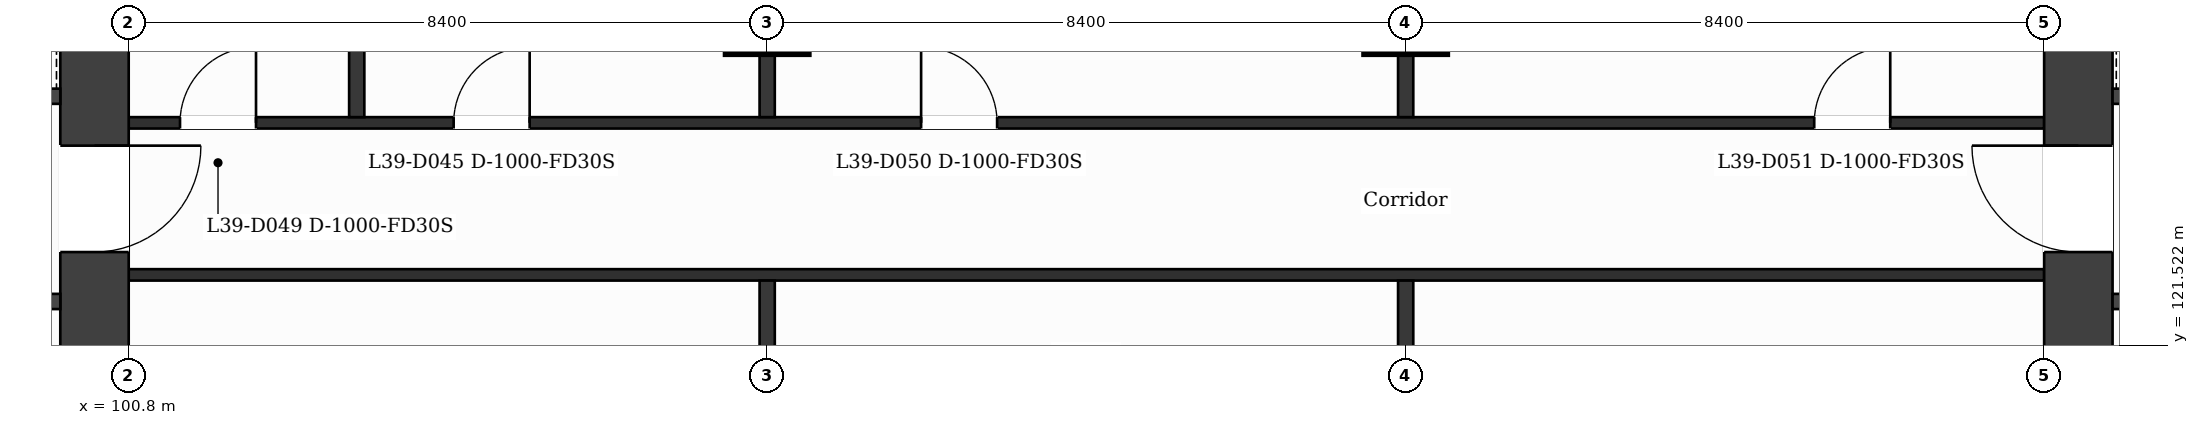
"""IFC4 building model, lengths in metres.
Left out: names, types, materials, properties, quantities, classifications, styles, units other than length and angle.
Written with IfcOpenShell. Run it as: python <this file> out.ifc"""

import sys

from ifc_helpers import new_model, si_unit, direction, frame, frame_2d, origin, origin_2d, place, context, subcontext, project, spatial, rectangle, extrude, element, fill, save


model = new_model("IFC4")
c1 = context("Model", 3, precision=1e-05, world=origin(), true_north=direction((0.0, 1.0)))
c2 = subcontext(c1, "Body", "Model", "MODEL_VIEW")
j1 = project(units=[si_unit("LENGTHUNIT", "METRE"), si_unit("PLANEANGLEUNIT", "RADIAN")], contexts=[c1])
p1 = place(None, origin())
s1 = spatial("IfcSite", under=j1, at=p1, CompositionType="ELEMENT")
p2 = place(p1, origin())
s2 = spatial("IfcBuilding", under=s1, at=p2, CompositionType="ELEMENT")
p3 = place(p2, frame((0.0, 0.0, 166.3)))
s3 = spatial("IfcBuildingStorey", under=s2, at=p3, CompositionType="ELEMENT", Elevation=166.3)
p4 = place(p3, frame((100.35, 131.95, 0.0), z_axis=(0.0, 0.0, 1.0), x_axis=(0.0, -1.0, 0.0)))
e1 = element("IfcWall", 1, at=p4, inside=s3, PredefinedType="SHEAR", context=c2, shape_type="SweptSolid", body=[
    extrude(rectangle(XDim=21.1, YDim=0.9, at=frame_2d((10.55, 0.0))), origin(), (0.0, 0.0, 1.0), 3.7),
])
p5 = place(p4, frame((7.8, 0.0, 0.0)))
e2 = element("IfcOpeningElement", 2, at=p5, cuts=e1, PredefinedType="OPENING", context=c2, shape_type="SweptSolid", body=[
    extrude(rectangle(XDim=1.4, YDim=2.1, at=frame_2d((0.7, 1.05))), frame((0.0, 0.46, 0.0), z_axis=(0.0, -1.0, 0.0), x_axis=(1.0, 0.0, 0.0)), (0.0, 0.0, 1.0), 0.92),
])
p6 = place(p3, frame((126.45, 110.85, 0.0), z_axis=(0.0, 0.0, 1.0), x_axis=(0.0, 1.0, 0.0)))
e3 = element("IfcWall", 3, at=p6, inside=s3, PredefinedType="SHEAR", context=c2, shape_type="SweptSolid", body=[
    extrude(rectangle(XDim=21.1, YDim=0.9, at=frame_2d((10.55, 0.0))), origin(), (0.0, 0.0, 1.0), 3.7),
])
p7 = place(p6, frame((11.9, 0.0, 0.0)))
e4 = element("IfcOpeningElement", 4, at=p7, cuts=e3, PredefinedType="OPENING", context=c2, shape_type="SweptSolid", body=[
    extrude(rectangle(XDim=1.4, YDim=2.1, at=frame_2d((0.7, 1.05))), frame((0.0, 0.46, 0.0), z_axis=(0.0, -1.0, 0.0), x_axis=(1.0, 0.0, 0.0)), (0.0, 0.0, 1.0), 0.92),
])
for number, where, z_axis, x_axis in (
    (5, (109.2, 125.9, 0.0), (0.0, 0.0, 1.0), (1.0, 0.0, 0.0)),
    (6, (117.6, 125.9, 0.0), (0.0, 0.0, 1.0), (1.0, 0.0, 0.0)),
):
    element("IfcColumn", number, at=place(p3, frame(where, z_axis=z_axis, x_axis=x_axis)), inside=s3, PredefinedType="COLUMN", context=c2, shape_type="SweptSolid", body=[
        extrude(rectangle(XDim=1.1, YDim=1.1, at=origin_2d()), origin(), (0.0, 0.0, 1.0), 3.7),
    ])
p8 = place(p3, frame((95.227, 122.1, 0.0), z_axis=(0.0, 0.0, 1.0), x_axis=(1.0, 0.0, 0.0)))
e7 = element("IfcWall", 7, at=p8, inside=s3, PredefinedType="PARTITIONING", context=c2, shape_type="SweptSolid", body=[
    extrude(rectangle(XDim=4.673, YDim=0.2, at=frame_2d((2.336, 0.0))), origin(), (0.0, 0.0, 1.0), 3.38),
])
p9 = place(p8, frame((2.655, 0.0, 0.0)))
e8 = element("IfcOpeningElement", 8, at=p9, cuts=e7, PredefinedType="OPENING", context=c2, shape_type="SweptSolid", body=[
    extrude(rectangle(XDim=0.9, YDim=2.1, at=frame_2d((0.45, 1.05))), frame((0.0, 0.11, 0.0), z_axis=(0.0, -1.0, 0.0), x_axis=(1.0, 0.0, 0.0)), (0.0, 0.0, 1.0), 0.22),
])
p10 = place(p3, frame((126.9, 122.1, 0.0), z_axis=(0.0, 0.0, 1.0), x_axis=(1.0, 0.0, 0.0)))
e9 = element("IfcWall", 9, at=p10, inside=s3, PredefinedType="PARTITIONING", context=c2, shape_type="SweptSolid", body=[
    extrude(rectangle(XDim=4.673, YDim=0.2, at=frame_2d((2.336, 0.0))), origin(), (0.0, 0.0, 1.0), 3.38),
])
p11 = place(p10, frame((2.655, 0.0, 0.0)))
e10 = element("IfcOpeningElement", 10, at=p11, cuts=e9, PredefinedType="OPENING", context=c2, shape_type="SweptSolid", body=[
    extrude(rectangle(XDim=0.9, YDim=2.1, at=frame_2d((0.45, 1.05))), frame((0.0, 0.11, 0.0), z_axis=(0.0, -1.0, 0.0), x_axis=(1.0, 0.0, 0.0)), (0.0, 0.0, 1.0), 0.22),
])
p12 = place(p3, frame((100.8, 122.45, 0.0), z_axis=(0.0, 0.0, 1.0), x_axis=(1.0, 0.0, 0.0)))
e11 = element("IfcWall", 11, at=p12, inside=s3, PredefinedType="PARTITIONING", context=c2, shape_type="SweptSolid", body=[
    extrude(rectangle(XDim=25.2, YDim=0.15, at=frame_2d((12.6, 0.0))), origin(), (0.0, 0.0, 1.0), 3.38),
])
p13 = place(p3, frame((100.8, 124.45, 0.0), z_axis=(0.0, 0.0, 1.0), x_axis=(1.0, 0.0, 0.0)))
e12 = element("IfcWall", 12, at=p13, inside=s3, PredefinedType="PARTITIONING", context=c2, shape_type="SweptSolid", body=[
    extrude(rectangle(XDim=25.2, YDim=0.15, at=frame_2d((12.6, 0.0))), origin(), (0.0, 0.0, 1.0), 3.38),
])
p14 = place(p13, frame((4.275, 0.0, 0.0)))
e13 = element("IfcOpeningElement", 13, at=p14, cuts=e12, PredefinedType="OPENING", context=c2, shape_type="SweptSolid", body=[
    extrude(rectangle(XDim=1.0, YDim=2.1, at=frame_2d((0.5, 1.05))), frame((0.0, 0.085, 0.0), z_axis=(0.0, -1.0, 0.0), x_axis=(1.0, 0.0, 0.0)), (0.0, 0.0, 1.0), 0.17),
])
p15 = place(p13, frame((0.675, 0.0, 0.0)))
e14 = element("IfcOpeningElement", 14, at=p15, cuts=e12, PredefinedType="OPENING", context=c2, shape_type="SweptSolid", body=[
    extrude(rectangle(XDim=1.0, YDim=2.1, at=frame_2d((0.5, 1.05))), frame((0.0, 0.085, 0.0), z_axis=(0.0, -1.0, 0.0), x_axis=(1.0, 0.0, 0.0)), (0.0, 0.0, 1.0), 0.17),
])
p16 = place(p13, frame((10.425, 0.0, 0.0)))
e15 = element("IfcOpeningElement", 15, at=p16, cuts=e12, PredefinedType="OPENING", context=c2, shape_type="SweptSolid", body=[
    extrude(rectangle(XDim=1.0, YDim=2.1, at=frame_2d((0.5, 1.05))), frame((0.0, 0.085, 0.0), z_axis=(0.0, -1.0, 0.0), x_axis=(1.0, 0.0, 0.0)), (0.0, 0.0, 1.0), 0.17),
])
p17 = place(p13, frame((22.175, 0.0, 0.0)))
e16 = element("IfcOpeningElement", 16, at=p17, cuts=e12, PredefinedType="OPENING", context=c2, shape_type="SweptSolid", body=[
    extrude(rectangle(XDim=1.0, YDim=2.1, at=frame_2d((0.5, 1.05))), frame((0.0, 0.085, 0.0), z_axis=(0.0, -1.0, 0.0), x_axis=(1.0, 0.0, 0.0)), (0.0, 0.0, 1.0), 0.17),
])
p18 = place(p3, frame((92.702, 124.8, 0.0), z_axis=(0.0, 0.0, 1.0), x_axis=(1.0, 0.0, 0.0)))
e17 = element("IfcWall", 17, at=p18, inside=s3, PredefinedType="PARTITIONING", context=c2, shape_type="SweptSolid", body=[
    extrude(rectangle(XDim=7.198, YDim=0.2, at=frame_2d((3.599, 0.0))), origin(), (0.0, 0.0, 1.0), 3.38),
])
p19 = place(p18, frame((5.469, 0.0, 0.0)))
e18 = element("IfcOpeningElement", 18, at=p19, cuts=e17, PredefinedType="OPENING", context=c2, shape_type="SweptSolid", body=[
    extrude(rectangle(XDim=1.1, YDim=2.1, at=frame_2d((0.55, 1.05))), frame((0.0, 0.11, 0.0), z_axis=(0.0, -1.0, 0.0), x_axis=(1.0, 0.0, 0.0)), (0.0, 0.0, 1.0), 0.22),
])
p20 = place(p3, frame((126.9, 124.8, 0.0), z_axis=(0.0, 0.0, 1.0), x_axis=(1.0, 0.0, 0.0)))
e19 = element("IfcWall", 19, at=p20, inside=s3, PredefinedType="PARTITIONING", context=c2, shape_type="SweptSolid", body=[
    extrude(rectangle(XDim=4.715, YDim=0.2, at=frame_2d((2.358, 0.0))), origin(), (0.0, 0.0, 1.0), 3.38),
])
p21 = place(p20, frame((0.629, 0.0, 0.0)))
e20 = element("IfcOpeningElement", 20, at=p21, cuts=e19, PredefinedType="OPENING", context=c2, shape_type="SweptSolid", body=[
    extrude(rectangle(XDim=1.1, YDim=2.1, at=frame_2d((0.55, 1.05))), frame((0.0, 0.11, 0.0), z_axis=(0.0, -1.0, 0.0), x_axis=(1.0, 0.0, 0.0)), (0.0, 0.0, 1.0), 0.22),
])
p22 = place(p3, frame((103.8, 124.525, 0.0), z_axis=(0.0, 0.0, 1.0), x_axis=(0.0, 1.0, 0.0)))
e21 = element("IfcWall", 21, at=p22, inside=s3, PredefinedType="PARTITIONING", context=c2, shape_type="SweptSolid", body=[
    extrude(rectangle(XDim=5.825, YDim=0.2, at=frame_2d((2.913, 0.0))), origin(), (0.0, 0.0, 1.0), 3.38),
])
p23 = place(p3, frame((109.2, 109.075, 0.0), z_axis=(0.0, 0.0, 1.0), x_axis=(0.0, 1.0, 0.0)))
e22 = element("IfcWall", 22, at=p23, inside=s3, PredefinedType="PARTITIONING", context=c2, shape_type="SweptSolid", body=[
    extrude(rectangle(XDim=13.3, YDim=0.2, at=frame_2d((6.65, 0.0))), origin(), (0.0, 0.0, 1.0), 3.38),
])
p24 = place(p3, frame((109.2, 124.525, 0.0), z_axis=(0.0, 0.0, 1.0), x_axis=(0.0, 1.0, 0.0)))
e23 = element("IfcWall", 23, at=p24, inside=s3, PredefinedType="PARTITIONING", context=c2, shape_type="SweptSolid", body=[
    extrude(rectangle(XDim=9.2, YDim=0.2, at=frame_2d((4.6, 0.0))), origin(), (0.0, 0.0, 1.0), 3.38),
])
p25 = place(p3, frame((117.6, 109.075, 0.0), z_axis=(0.0, 0.0, 1.0), x_axis=(0.0, 1.0, 0.0)))
e24 = element("IfcWall", 24, at=p25, inside=s3, PredefinedType="PARTITIONING", context=c2, shape_type="SweptSolid", body=[
    extrude(rectangle(XDim=13.3, YDim=0.2, at=frame_2d((6.65, 0.0))), origin(), (0.0, 0.0, 1.0), 3.38),
])
p26 = place(p3, frame((117.6, 124.525, 0.0), z_axis=(0.0, 0.0, 1.0), x_axis=(0.0, 1.0, 0.0)))
e25 = element("IfcWall", 25, at=p26, inside=s3, PredefinedType="PARTITIONING", context=c2, shape_type="SweptSolid", body=[
    extrude(rectangle(XDim=9.2, YDim=0.2, at=frame_2d((4.6, 0.0))), origin(), (0.0, 0.0, 1.0), 3.38),
])
p27 = place(p14, origin())
e26 = element("IfcDoor", 26, at=p27, inside=s3, OperationType="SINGLE_SWING_RIGHT", PredefinedType="DOOR", context=c2, shape_type="SweptSolid", body=[
    extrude(rectangle(XDim=1.0, YDim=2.1, at=frame_2d((0.5, 1.05))), frame((0.0, 0.025, 0.0), z_axis=(0.0, -1.0, 0.0), x_axis=(1.0, 0.0, 0.0)), (0.0, 0.0, 1.0), 0.05),
])
fill(e13, e26)
p28 = place(p15, origin())
e27 = element("IfcDoor", 27, at=p28, inside=s3, OperationType="SINGLE_SWING_RIGHT", PredefinedType="DOOR", context=c2, shape_type="SweptSolid", body=[
    extrude(rectangle(XDim=1.0, YDim=2.1, at=frame_2d((0.5, 1.05))), frame((0.0, 0.025, 0.0), z_axis=(0.0, -1.0, 0.0), x_axis=(1.0, 0.0, 0.0)), (0.0, 0.0, 1.0), 0.05),
])
fill(e14, e27)
p29 = place(p16, origin())
e28 = element("IfcDoor", 28, at=p29, inside=s3, OperationType="SINGLE_SWING_LEFT", PredefinedType="DOOR", context=c2, shape_type="SweptSolid", body=[
    extrude(rectangle(XDim=1.0, YDim=2.1, at=frame_2d((0.5, 1.05))), frame((0.0, 0.025, 0.0), z_axis=(0.0, -1.0, 0.0), x_axis=(1.0, 0.0, 0.0)), (0.0, 0.0, 1.0), 0.05),
])
fill(e15, e28)
p30 = place(p17, origin())
e29 = element("IfcDoor", 29, at=p30, inside=s3, OperationType="SINGLE_SWING_RIGHT", PredefinedType="DOOR", context=c2, shape_type="SweptSolid", body=[
    extrude(rectangle(XDim=1.0, YDim=2.1, at=frame_2d((0.5, 1.05))), frame((0.0, 0.025, 0.0), z_axis=(0.0, -1.0, 0.0), x_axis=(1.0, 0.0, 0.0)), (0.0, 0.0, 1.0), 0.05),
])
fill(e16, e29)
p31 = place(p5, origin())
e30 = element("IfcDoor", 30, at=p31, inside=s3, OperationType="SINGLE_SWING_LEFT", PredefinedType="DOOR", context=c2, shape_type="SweptSolid", body=[
    extrude(rectangle(XDim=1.4, YDim=2.1, at=frame_2d((0.7, 1.05))), frame((0.0, 0.025, 0.0), z_axis=(0.0, -1.0, 0.0), x_axis=(1.0, 0.0, 0.0)), (0.0, 0.0, 1.0), 0.05),
])
fill(e2, e30)
p32 = place(p7, origin())
e31 = element("IfcDoor", 31, at=p32, inside=s3, OperationType="SINGLE_SWING_RIGHT", PredefinedType="DOOR", context=c2, shape_type="SweptSolid", body=[
    extrude(rectangle(XDim=1.4, YDim=2.1, at=frame_2d((0.7, 1.05))), frame((0.0, 0.025, 0.0), z_axis=(0.0, -1.0, 0.0), x_axis=(1.0, 0.0, 0.0)), (0.0, 0.0, 1.0), 0.05),
])
fill(e4, e31)
save(model, sys.argv[1])
